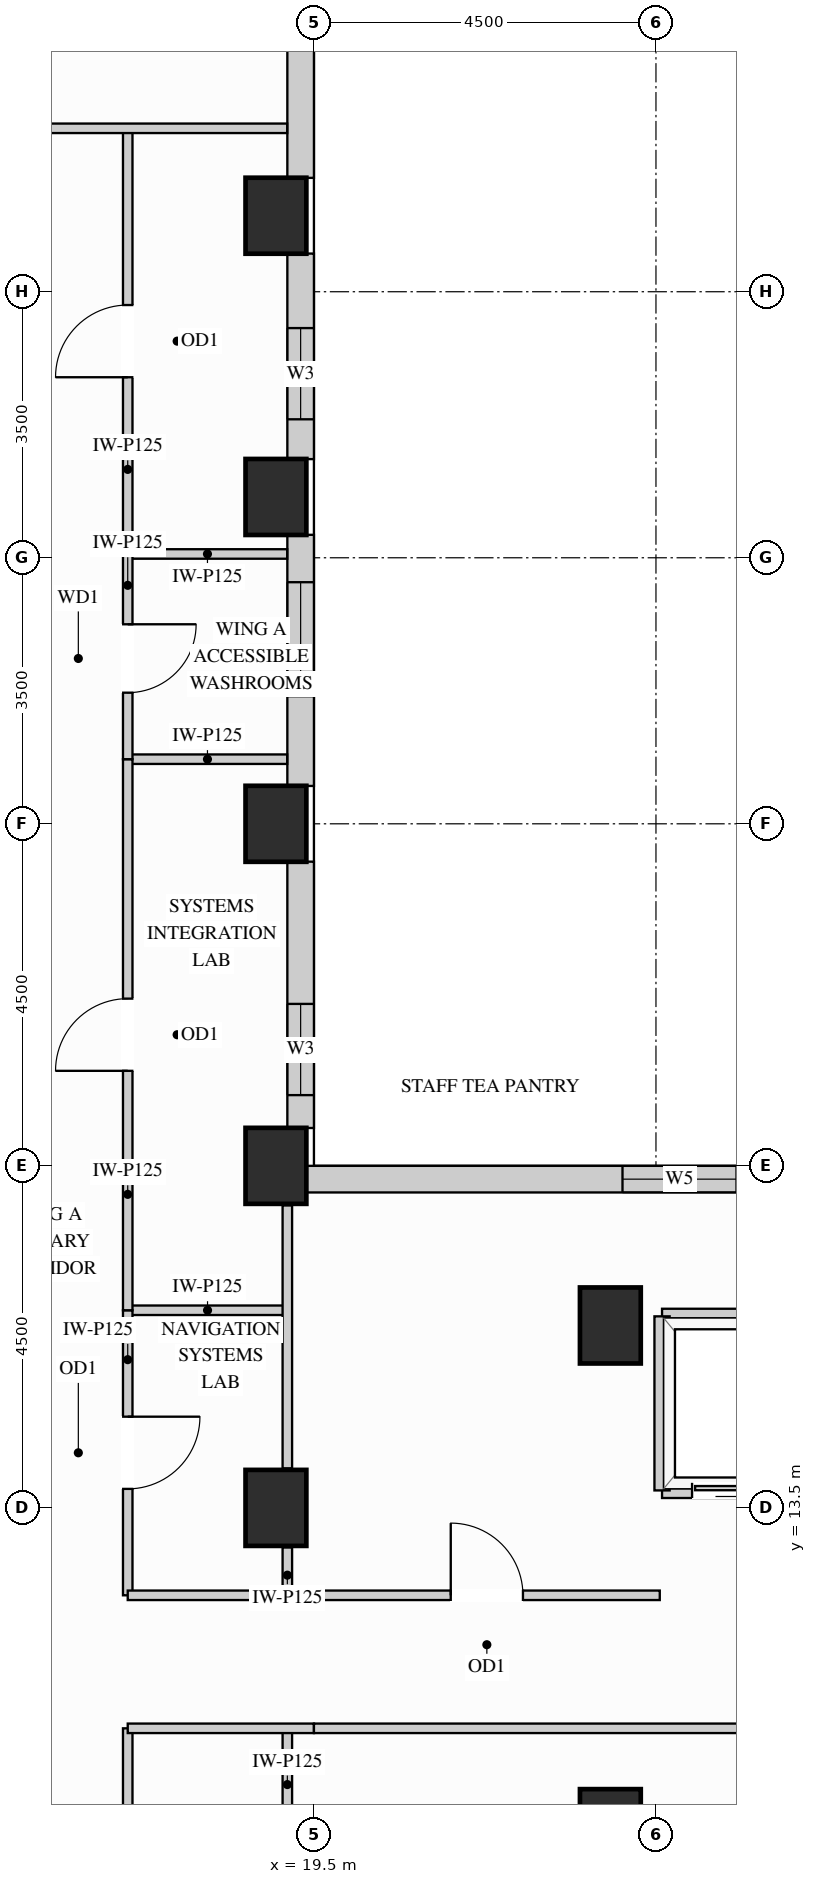
"""IFC4 building model, lengths in metres.
Left out: names, types, materials, properties, quantities, classifications, styles, units other than length and angle.
Written with IfcOpenShell. Run it as: python <this file> out.ifc"""

import sys

from ifc_helpers import new_model, si_unit, direction, frame, frame_2d, origin, origin_2d, place, context, subcontext, project, spatial, rectangle, extrude, source, transform, mapped, element, fill, save


model = new_model("IFC4")
c1 = context("Model", 3, precision=1e-05, world=origin(), true_north=direction((0.0, 1.0)))
c2 = subcontext(c1, "Body", "Model", "MODEL_VIEW")
j1 = project(units=[si_unit("LENGTHUNIT", "METRE"), si_unit("PLANEANGLEUNIT", "RADIAN")], contexts=[c1])
p1 = place(None, origin())
s1 = spatial("IfcSite", under=j1, at=p1, CompositionType="ELEMENT")
p2 = place(p1, origin())
s2 = spatial("IfcBuilding", under=s1, at=p2, CompositionType="ELEMENT")
p3 = place(p2, frame((0.0, 0.0, 143.1)))
s3 = spatial("IfcBuildingStorey", under=s2, at=p3, CompositionType="ELEMENT", Elevation=143.1)
m1 = source(origin(), c2, "Body", "SweptSolid", [
    extrude(rectangle(XDim=0.8, YDim=1.0, at=origin_2d()), origin(), (0.0, 0.0, 1.0), 3.4),
])
for number, where, z_axis, x_axis in (
    (1, (19.0, 13.5, 0.0), (0.0, 0.0, 1.0), (1.0, 0.0, 0.0)),
    (2, (19.0, 18.0, 0.0), (0.0, 0.0, 1.0), (1.0, 0.0, 0.0)),
    (3, (19.0, 22.5, 0.0), (0.0, 0.0, 1.0), (1.0, 0.0, 0.0)),
    (4, (19.0, 26.8, 0.0), (0.0, 0.0, 1.0), (1.0, 0.0, 0.0)),
    (5, (19.0, 30.5, 0.0), (0.0, 0.0, 1.0), (1.0, 0.0, 0.0)),
    (6, (23.4, 15.9, 0.0), (0.0, 0.0, 1.0), (1.0, 0.0, 0.0)),
    (7, (23.4, 9.3, 0.0), (0.0, 0.0, 1.0), (1.0, 0.0, 0.0)),
):
    element("IfcColumn", number, at=place(p3, frame(where, z_axis=z_axis, x_axis=x_axis)), inside=s3, PredefinedType="COLUMN", context=c2, shape_type="MappedRepresentation", body=[
        mapped(m1, transform((0.0, 0.0, 0.0), x_axis=(1.0, 0.0, 0.0), y_axis=(0.0, 1.0, 0.0), z_axis=(0.0, 0.0, 1.0))),
    ])
p4 = place(p3, frame((34.502, 17.825, 0.0), z_axis=(0.0, 0.0, 1.0), x_axis=(-1.0, 0.0, 0.0)))
e8 = element("IfcWall", 8, at=p4, inside=s3, PredefinedType="SOLIDWALL", context=c2, shape_type="SweptSolid", body=[
    extrude(rectangle(XDim=15.104, YDim=0.35, at=frame_2d((7.552, 0.0))), origin(), (0.0, 0.0, 1.0), 3.385),
])
p5 = place(p4, frame((4.131, 0.0, 0.78)))
e9 = element("IfcOpeningElement", 9, at=p5, cuts=e8, PredefinedType="OPENING", context=c2, shape_type="SweptSolid", body=[
    extrude(rectangle(XDim=1.5, YDim=2.0, at=frame_2d((0.75, 1.0))), frame((0.0, 0.185, 0.0), z_axis=(0.0, -1.0, 0.0), x_axis=(1.0, 0.0, 0.0)), (0.0, 0.0, 1.0), 0.37),
])
p6 = place(p4, frame((9.442, 0.0, 0.78)))
e10 = element("IfcOpeningElement", 10, at=p6, cuts=e8, PredefinedType="OPENING", context=c2, shape_type="SweptSolid", body=[
    extrude(rectangle(XDim=1.5, YDim=2.0, at=frame_2d((0.75, 1.0))), frame((0.0, 0.185, 0.0), z_axis=(0.0, -1.0, 0.0), x_axis=(1.0, 0.0, 0.0)), (0.0, 0.0, 1.0), 0.37),
])
p7 = place(p3, frame((19.325, 18.498, 0.0), z_axis=(0.0, 0.0, 1.0), x_axis=(0.0, 1.0, 0.0)))
e11 = element("IfcWall", 11, at=p7, inside=s3, PredefinedType="SOLIDWALL", context=c2, shape_type="SweptSolid", body=[
    extrude(rectangle(XDim=3.504, YDim=0.35, at=frame_2d((1.752, 0.0))), origin(), (0.0, 0.0, 1.0), 2.612),
])
p8 = place(p7, frame((0.433, 0.0, 0.78)))
e12 = element("IfcOpeningElement", 12, at=p8, cuts=e11, PredefinedType="OPENING", context=c2, shape_type="SweptSolid", body=[
    extrude(rectangle(XDim=1.2, YDim=1.652, at=frame_2d((0.6, 0.826))), frame((0.0, 0.185, 0.0), z_axis=(0.0, -1.0, 0.0), x_axis=(1.0, 0.0, 0.0)), (0.0, 0.0, 1.0), 0.37),
])
p9 = place(p3, frame((19.325, 22.998, 0.0), z_axis=(0.0, 0.0, 1.0), x_axis=(0.0, 1.0, 0.0)))
e13 = element("IfcWall", 13, at=p9, inside=s3, PredefinedType="SOLIDWALL", context=c2, shape_type="SweptSolid", body=[
    extrude(rectangle(XDim=3.304, YDim=0.35, at=frame_2d((1.652, 0.0))), origin(), (0.0, 0.0, 1.0), 2.612),
])
p10 = place(p9, frame((1.18, 0.0, 0.78)))
e14 = element("IfcOpeningElement", 14, at=p10, cuts=e13, PredefinedType="OPENING", context=c2, shape_type="SweptSolid", body=[
    extrude(rectangle(XDim=1.5, YDim=1.652, at=frame_2d((0.75, 0.826))), frame((0.0, 0.185, 0.0), z_axis=(0.0, -1.0, 0.0), x_axis=(1.0, 0.0, 0.0)), (0.0, 0.0, 1.0), 0.37),
])
p11 = place(p3, frame((19.325, 27.298, 0.0), z_axis=(0.0, 0.0, 1.0), x_axis=(0.0, 1.0, 0.0)))
e15 = element("IfcWall", 15, at=p11, inside=s3, PredefinedType="SOLIDWALL", context=c2, shape_type="SweptSolid", body=[
    extrude(rectangle(XDim=2.704, YDim=0.35, at=frame_2d((1.352, 0.0))), origin(), (0.0, 0.0, 1.0), 2.612),
])
p12 = place(p11, frame((0.524, 0.0, 0.78)))
e16 = element("IfcOpeningElement", 16, at=p12, cuts=e15, PredefinedType="OPENING", context=c2, shape_type="SweptSolid", body=[
    extrude(rectangle(XDim=1.2, YDim=1.652, at=frame_2d((0.6, 0.826))), frame((0.0, 0.185, 0.0), z_axis=(0.0, -1.0, 0.0), x_axis=(1.0, 0.0, 0.0)), (0.0, 0.0, 1.0), 0.37),
])
m2 = source(origin(), c2, "Body", "SweptSolid", [
    extrude(rectangle(XDim=3.504, YDim=0.35, at=frame_2d((1.752, 0.0))), origin(), (0.0, 0.0, 1.0), 2.612),
])
p13 = place(p3, frame((19.325, 30.998, 0.0), z_axis=(0.0, 0.0, 1.0), x_axis=(0.0, 1.0, 0.0)))
e17 = element("IfcWall", 17, at=p13, inside=s3, PredefinedType="SOLIDWALL", context=c2, shape_type="MappedRepresentation", body=[
    mapped(m2, transform((0.0, 0.0, 0.0), x_axis=(1.0, 0.0, 0.0), y_axis=(0.0, 1.0, 0.0), z_axis=(0.0, 0.0, 1.0))),
])
m3 = source(origin(), c2, "Body", "SweptSolid", [
    extrude(rectangle(XDim=2.1, YDim=0.125, at=frame_2d((1.05, 0.0))), origin(), (0.0, 0.0, 1.0), 3.385),
])
p14 = place(p3, frame((17.05, 16.1, 0.0), z_axis=(0.0, 0.0, 1.0), x_axis=(1.0, 0.0, 0.0)))
e18 = element("IfcWall", 18, at=p14, inside=s3, PredefinedType="PARTITIONING", context=c2, shape_type="MappedRepresentation", body=[
    mapped(m3, transform((0.0, 0.0, 0.0), x_axis=(1.0, 0.0, 0.0), y_axis=(0.0, 1.0, 0.0), z_axis=(0.0, 0.0, 1.0))),
])
m4 = source(origin(), c2, "Body", "SweptSolid", [
    extrude(rectangle(XDim=2.098, YDim=0.125, at=frame_2d((1.049, 0.0))), origin(), (0.0, 0.0, 1.0), 3.385),
])
for number, where, z_axis, x_axis in (
    (19, (17.05, 23.35, 0.0), (0.0, 0.0, 1.0), (1.0, 0.0, 0.0)),
    (20, (17.05, 26.05, 0.0), (0.0, 0.0, 1.0), (1.0, 0.0, 0.0)),
):
    element("IfcWall", number, at=place(p3, frame(where, z_axis=z_axis, x_axis=x_axis)), inside=s3, PredefinedType="PARTITIONING", context=c2, shape_type="MappedRepresentation", body=[
        mapped(m4, transform((0.0, 0.0, 0.0), x_axis=(1.0, 0.0, 0.0), y_axis=(0.0, 1.0, 0.0), z_axis=(0.0, 0.0, 1.0))),
    ])
m5 = source(origin(), c2, "Body", "SweptSolid", [
    extrude(rectangle(XDim=0.63, YDim=0.125, at=frame_2d((0.315, 0.0))), origin(), (0.0, 0.0, 1.0), 2.773),
])
p15 = place(p3, frame((19.15, 12.35, 0.0), z_axis=(0.0, 0.0, 1.0), x_axis=(0.0, 1.0, 0.0)))
e21 = element("IfcWall", 21, at=p15, inside=s3, PredefinedType="PARTITIONING", context=c2, shape_type="MappedRepresentation", body=[
    mapped(m5, transform((0.0, 0.0, 0.0), x_axis=(1.0, 0.0, 0.0), y_axis=(0.0, 1.0, 0.0), z_axis=(0.0, 0.0, 1.0))),
])
m6 = source(origin(), c2, "Body", "SweptSolid", [
    extrude(rectangle(XDim=3.46, YDim=0.125, at=frame_2d((1.73, 0.0))), origin(), (0.0, 0.0, 1.0), 2.773),
])
p16 = place(p3, frame((19.15, 14.02, 0.0), z_axis=(0.0, 0.0, 1.0), x_axis=(0.0, 1.0, 0.0)))
e22 = element("IfcWall", 22, at=p16, inside=s3, PredefinedType="PARTITIONING", context=c2, shape_type="MappedRepresentation", body=[
    mapped(m6, transform((0.0, 0.0, 0.0), x_axis=(1.0, 0.0, 0.0), y_axis=(0.0, 1.0, 0.0), z_axis=(0.0, 0.0, 1.0))),
])
m7 = source(origin(), c2, "Body", "SweptSolid", [
    extrude(rectangle(XDim=1.58, YDim=0.125, at=frame_2d((0.79, 0.0))), origin(), (0.0, 0.0, 1.0), 2.773),
])
p17 = place(p3, frame((19.15, 9.02, 0.0), z_axis=(0.0, 0.0, 1.0), x_axis=(0.0, 1.0, 0.0)))
e23 = element("IfcWall", 23, at=p17, inside=s3, PredefinedType="PARTITIONING", context=c2, shape_type="MappedRepresentation", body=[
    mapped(m7, transform((0.0, 0.0, 0.0), x_axis=(1.0, 0.0, 0.0), y_axis=(0.0, 1.0, 0.0), z_axis=(0.0, 0.0, 1.0))),
])
p18 = place(p3, frame((17.05, 12.35, 0.0), z_axis=(0.0, 0.0, 1.0), x_axis=(0.0, 1.0, 0.0)))
e24 = element("IfcWall", 24, at=p18, inside=s3, PredefinedType="PARTITIONING", context=c2, shape_type="SweptSolid", body=[
    extrude(rectangle(XDim=3.75, YDim=0.125, at=frame_2d((1.875, 0.0))), origin(), (0.0, 0.0, 1.0), 3.385),
])
p19 = place(p18, frame((1.4, 0.0, 0.0)))
e25 = element("IfcOpeningElement", 25, at=p19, cuts=e24, PredefinedType="OPENING", context=c2, shape_type="SweptSolid", body=[
    extrude(rectangle(XDim=0.95, YDim=2.15, at=frame_2d((0.475, 1.075))), frame((0.0, 0.073, 0.0), z_axis=(0.0, -1.0, 0.0), x_axis=(1.0, 0.0, 0.0)), (0.0, 0.0, 1.0), 0.145),
])
p20 = place(p3, frame((17.05, 16.1, 0.0), z_axis=(0.0, 0.0, 1.0), x_axis=(0.0, 1.0, 0.0)))
e26 = element("IfcWall", 26, at=p20, inside=s3, PredefinedType="PARTITIONING", context=c2, shape_type="SweptSolid", body=[
    extrude(rectangle(XDim=7.25, YDim=0.125, at=frame_2d((3.625, 0.0))), origin(), (0.0, 0.0, 1.0), 3.385),
])
p21 = place(p20, frame((3.15, 0.0, 0.0)))
e27 = element("IfcOpeningElement", 27, at=p21, cuts=e26, PredefinedType="OPENING", context=c2, shape_type="SweptSolid", body=[
    extrude(rectangle(XDim=0.95, YDim=2.15, at=frame_2d((0.475, 1.075))), frame((0.0, 0.073, 0.0), z_axis=(0.0, -1.0, 0.0), x_axis=(1.0, 0.0, 0.0)), (0.0, 0.0, 1.0), 0.145),
])
p22 = place(p3, frame((17.05, 26.05, 0.0), z_axis=(0.0, 0.0, 1.0), x_axis=(0.0, 1.0, 0.0)))
e28 = element("IfcWall", 28, at=p22, inside=s3, PredefinedType="PARTITIONING", context=c2, shape_type="SweptSolid", body=[
    extrude(rectangle(XDim=5.6, YDim=0.125, at=frame_2d((2.8, 0.0))), origin(), (0.0, 0.0, 1.0), 3.385),
])
p23 = place(p22, frame((2.325, 0.0, 0.0)))
e29 = element("IfcOpeningElement", 29, at=p23, cuts=e28, PredefinedType="OPENING", context=c2, shape_type="SweptSolid", body=[
    extrude(rectangle(XDim=0.95, YDim=2.15, at=frame_2d((0.475, 1.075))), frame((0.0, 0.073, 0.0), z_axis=(0.0, -1.0, 0.0), x_axis=(1.0, 0.0, 0.0)), (0.0, 0.0, 1.0), 0.145),
])
p24 = place(p3, frame((17.05, 4.65, 0.0), z_axis=(0.0, 0.0, 1.0), x_axis=(0.0, 1.0, 0.0)))
e30 = element("IfcWall", 30, at=p24, inside=s3, PredefinedType="PARTITIONING", context=c2, shape_type="SweptSolid", body=[
    extrude(rectangle(XDim=5.95, YDim=0.125, at=frame_2d((2.975, 0.0))), origin(), (0.0, 0.0, 1.0), 3.385),
])
p25 = place(p24, frame((2.5, 0.0, 0.0)))
e31 = element("IfcOpeningElement", 31, at=p25, cuts=e30, PredefinedType="OPENING", context=c2, shape_type="SweptSolid", body=[
    extrude(rectangle(XDim=0.95, YDim=2.15, at=frame_2d((0.475, 1.075))), frame((0.0, 0.073, 0.0), z_axis=(0.0, -1.0, 0.0), x_axis=(1.0, 0.0, 0.0)), (0.0, 0.0, 1.0), 0.145),
])
p26 = place(p3, frame((17.05, 23.35, 0.0), z_axis=(0.0, 0.0, 1.0), x_axis=(0.0, 1.0, 0.0)))
e32 = element("IfcWall", 32, at=p26, inside=s3, PredefinedType="PARTITIONING", context=c2, shape_type="SweptSolid", body=[
    extrude(rectangle(XDim=2.7, YDim=0.125, at=frame_2d((1.35, 0.0))), origin(), (0.0, 0.0, 1.0), 3.385),
])
p27 = place(p26, frame((0.875, 0.0, 0.0)))
e33 = element("IfcOpeningElement", 33, at=p27, cuts=e32, PredefinedType="OPENING", context=c2, shape_type="SweptSolid", body=[
    extrude(rectangle(XDim=0.9, YDim=2.15, at=frame_2d((0.45, 1.075))), frame((0.0, 0.073, 0.0), z_axis=(0.0, -1.0, 0.0), x_axis=(1.0, 0.0, 0.0)), (0.0, 0.0, 1.0), 0.145),
])
m8 = source(origin(), c2, "Body", "SweptSolid", [
    extrude(rectangle(XDim=12.598, YDim=0.125, at=frame_2d((6.299, 0.0))), origin(), (0.0, 0.0, 1.0), 2.848),
])
p28 = place(p3, frame((6.55, 31.65, 0.0), z_axis=(0.0, 0.0, 1.0), x_axis=(1.0, 0.0, 0.0)))
e34 = element("IfcWall", 34, at=p28, inside=s3, PredefinedType="PARTITIONING", context=c2, shape_type="MappedRepresentation", body=[
    mapped(m8, transform((0.0, 0.0, 0.0), x_axis=(1.0, 0.0, 0.0), y_axis=(0.0, 1.0, 0.0), z_axis=(0.0, 0.0, 1.0))),
])
m9 = source(origin(), c2, "Body", "SweptSolid", [
    extrude(rectangle(XDim=2.45, YDim=0.125, at=frame_2d((1.225, 0.0))), origin(), (0.0, 0.0, 1.0), 3.385),
])
p29 = place(p3, frame((17.05, 12.35, 0.0), z_axis=(0.0, 0.0, 1.0), x_axis=(1.0, 0.0, 0.0)))
e35 = element("IfcWall", 35, at=p29, inside=s3, PredefinedType="PARTITIONING", context=c2, shape_type="MappedRepresentation", body=[
    mapped(m9, transform((0.0, 0.0, 0.0), x_axis=(1.0, 0.0, 0.0), y_axis=(0.0, 1.0, 0.0), z_axis=(0.0, 0.0, 1.0))),
])
p30 = place(p3, frame((19.5, 12.35, 0.0), z_axis=(0.0, 0.0, 1.0), x_axis=(1.0, 0.0, 0.0)))
e36 = element("IfcWall", 36, at=p30, inside=s3, PredefinedType="PARTITIONING", context=c2, shape_type="SweptSolid", body=[
    extrude(rectangle(XDim=4.55, YDim=0.125, at=frame_2d((2.275, 0.0))), origin(), (0.0, 0.0, 1.0), 3.385),
])
p31 = place(p30, frame((1.8, 0.0, 0.0)))
e37 = element("IfcOpeningElement", 37, at=p31, cuts=e36, PredefinedType="OPENING", context=c2, shape_type="SweptSolid", body=[
    extrude(rectangle(XDim=0.95, YDim=2.15, at=frame_2d((0.475, 1.075))), frame((0.0, 0.073, 0.0), z_axis=(0.0, -1.0, 0.0), x_axis=(1.0, 0.0, 0.0)), (0.0, 0.0, 1.0), 0.145),
])
p32 = place(p3, frame((17.05, 10.6, 0.0), z_axis=(0.0, 0.0, 1.0), x_axis=(1.0, 0.0, 0.0)))
e38 = element("IfcWall", 38, at=p32, inside=s3, PredefinedType="PARTITIONING", context=c2, shape_type="MappedRepresentation", body=[
    mapped(m9, transform((0.0, 0.0, 0.0), x_axis=(1.0, 0.0, 0.0), y_axis=(0.0, 1.0, 0.0), z_axis=(0.0, 0.0, 1.0))),
])
p33 = place(p3, frame((19.5, 10.6, 0.0), z_axis=(0.0, 0.0, 1.0), x_axis=(1.0, 0.0, 0.0)))
e39 = element("IfcWall", 39, at=p33, inside=s3, PredefinedType="PARTITIONING", context=c2, shape_type="SweptSolid", body=[
    extrude(rectangle(XDim=14.9, YDim=0.125, at=frame_2d((7.45, 0.0))), origin(), (0.0, 0.0, 1.0), 3.385),
])
p34 = place(p33, frame((6.975, 0.0, 0.0)))
e40 = element("IfcOpeningElement", 40, at=p34, cuts=e39, PredefinedType="OPENING", context=c2, shape_type="SweptSolid", body=[
    extrude(rectangle(XDim=0.95, YDim=2.15, at=frame_2d((0.475, 1.075))), frame((0.0, 0.073, 0.0), z_axis=(0.0, -1.0, 0.0), x_axis=(1.0, 0.0, 0.0)), (0.0, 0.0, 1.0), 0.145),
])
m10 = source(origin(), c2, "Body", "SweptSolid", [
    extrude(rectangle(XDim=1.89, YDim=0.2, at=frame_2d((0.945, 0.0))), origin(), (0.0, 0.0, 1.0), 2.773),
])
p35 = place(p3, frame((24.08, 16.02, 0.0), z_axis=(0.0, 0.0, 1.0), x_axis=(1.0, 0.0, 0.0)))
e41 = element("IfcWall", 41, at=p35, inside=s3, PredefinedType="PARTITIONING", context=c2, shape_type="MappedRepresentation", body=[
    mapped(m10, transform((0.0, 0.0, 0.0), x_axis=(1.0, 0.0, 0.0), y_axis=(0.0, 1.0, 0.0), z_axis=(0.0, 0.0, 1.0))),
])
p36 = place(p3, frame((24.08, 13.73, 0.0), z_axis=(0.0, 0.0, 1.0), x_axis=(1.0, 0.0, 0.0)))
e42 = element("IfcWall", 42, at=p36, inside=s3, PredefinedType="PARTITIONING", context=c2, shape_type="SweptSolid", body=[
    extrude(rectangle(XDim=1.89, YDim=0.2, at=frame_2d((0.945, 0.0))), origin(), (0.0, 0.0, 1.0), 2.466),
])
p37 = place(p36, frame((0.395, 0.0, 0.0)))
e43 = element("IfcOpeningElement", 43, at=p37, cuts=e42, PredefinedType="OPENING", context=c2, shape_type="SweptSolid", body=[
    extrude(rectangle(XDim=1.1, YDim=2.2, at=frame_2d((0.55, 1.1))), frame((0.0, 0.11, 0.0), z_axis=(0.0, -1.0, 0.0), x_axis=(1.0, 0.0, 0.0)), (0.0, 0.0, 1.0), 0.22),
])
m11 = source(origin(), c2, "Body", "SweptSolid", [
    extrude(rectangle(XDim=2.29, YDim=0.2, at=frame_2d((1.145, 0.0))), origin(), (0.0, 0.0, 1.0), 3.385),
])
p38 = place(p3, frame((24.08, 13.73, 0.0), z_axis=(0.0, 0.0, 1.0), x_axis=(0.0, 1.0, 0.0)))
e44 = element("IfcWall", 44, at=p38, inside=s3, PredefinedType="PARTITIONING", context=c2, shape_type="MappedRepresentation", body=[
    mapped(m11, transform((0.0, 0.0, 0.0), x_axis=(1.0, 0.0, 0.0), y_axis=(0.0, 1.0, 0.0), z_axis=(0.0, 0.0, 1.0))),
])
m12 = source(origin(), c2, "Body", "SweptSolid", [
    extrude(rectangle(XDim=1.1, YDim=2.2, at=frame_2d((0.55, 1.1))), frame((0.0, 0.025, 0.0), z_axis=(0.0, -1.0, 0.0), x_axis=(1.0, 0.0, 0.0)), (0.0, 0.0, 1.0), 0.05),
])
p39 = place(p37, origin())
e45 = element("IfcDoor", 45, at=p39, inside=s3, OperationType="SLIDING_TO_LEFT", PredefinedType="DOOR", context=c2, shape_type="MappedRepresentation", body=[
    mapped(m12, transform((0.0, 0.0, 0.0), x_axis=(1.0, 0.0, 0.0), y_axis=(0.0, 1.0, 0.0), z_axis=(0.0, 0.0, 1.0))),
])
fill(e43, e45)
m13 = source(origin(), c2, "Body", "SweptSolid", [
    extrude(rectangle(XDim=0.95, YDim=2.15, at=frame_2d((0.475, 1.075))), frame((0.0, 0.025, 0.0), z_axis=(0.0, -1.0, 0.0), x_axis=(1.0, 0.0, 0.0)), (0.0, 0.0, 1.0), 0.05),
])
p40 = place(p19, origin())
e46 = element("IfcDoor", 46, at=p40, inside=s3, OperationType="SINGLE_SWING_RIGHT", PredefinedType="DOOR", context=c2, shape_type="MappedRepresentation", body=[
    mapped(m13, transform((0.0, 0.0, 0.0), x_axis=(1.0, 0.0, 0.0), y_axis=(0.0, 1.0, 0.0), z_axis=(0.0, 0.0, 1.0))),
])
fill(e25, e46)
p41 = place(p21, origin())
e47 = element("IfcDoor", 47, at=p41, inside=s3, OperationType="SINGLE_SWING_LEFT", PredefinedType="DOOR", context=c2, shape_type="MappedRepresentation", body=[
    mapped(m13, transform((0.0, 0.0, 0.0), x_axis=(1.0, 0.0, 0.0), y_axis=(0.0, 1.0, 0.0), z_axis=(0.0, 0.0, 1.0))),
])
fill(e27, e47)
p42 = place(p23, origin())
e48 = element("IfcDoor", 48, at=p42, inside=s3, OperationType="SINGLE_SWING_LEFT", PredefinedType="DOOR", context=c2, shape_type="MappedRepresentation", body=[
    mapped(m13, transform((0.0, 0.0, 0.0), x_axis=(1.0, 0.0, 0.0), y_axis=(0.0, 1.0, 0.0), z_axis=(0.0, 0.0, 1.0))),
])
fill(e29, e48)
p43 = place(p31, origin())
e49 = element("IfcDoor", 49, at=p43, inside=s3, OperationType="SINGLE_SWING_LEFT", PredefinedType="DOOR", context=c2, shape_type="MappedRepresentation", body=[
    mapped(m13, transform((0.0, 0.0, 0.0), x_axis=(1.0, 0.0, 0.0), y_axis=(0.0, 1.0, 0.0), z_axis=(0.0, 0.0, 1.0))),
])
fill(e37, e49)
m14 = source(origin(), c2, "Body", "SweptSolid", [
    extrude(rectangle(XDim=0.9, YDim=2.15, at=frame_2d((0.45, 1.075))), frame((0.0, 0.025, 0.0), z_axis=(0.0, -1.0, 0.0), x_axis=(1.0, 0.0, 0.0)), (0.0, 0.0, 1.0), 0.05),
])
p44 = place(p27, origin())
e50 = element("IfcDoor", 50, at=p44, inside=s3, OperationType="SINGLE_SWING_RIGHT", PredefinedType="DOOR", context=c2, shape_type="MappedRepresentation", body=[
    mapped(m14, transform((0.0, 0.0, 0.0), x_axis=(1.0, 0.0, 0.0), y_axis=(0.0, 1.0, 0.0), z_axis=(0.0, 0.0, 1.0))),
])
fill(e33, e50)
m15 = source(origin(), c2, "Body", "SweptSolid", [
    extrude(rectangle(XDim=1.2, YDim=1.652, at=frame_2d((0.6, 0.826))), frame((0.0, 0.03, 0.0), z_axis=(0.0, -1.0, 0.0), x_axis=(1.0, 0.0, 0.0)), (0.0, 0.0, 1.0), 0.06),
])
p45 = place(p8, origin())
e51 = element("IfcWindow", 51, at=p45, inside=s3, PartitioningType="SINGLE_PANEL", PredefinedType="WINDOW", context=c2, shape_type="MappedRepresentation", body=[
    mapped(m15, transform((0.0, 0.0, 0.0), x_axis=(1.0, 0.0, 0.0), y_axis=(0.0, 1.0, 0.0), z_axis=(0.0, 0.0, 1.0))),
])
fill(e12, e51)
p46 = place(p12, origin())
e52 = element("IfcWindow", 52, at=p46, inside=s3, PartitioningType="SINGLE_PANEL", PredefinedType="WINDOW", context=c2, shape_type="MappedRepresentation", body=[
    mapped(m15, transform((0.0, 0.0, 0.0), x_axis=(1.0, 0.0, 0.0), y_axis=(0.0, 1.0, 0.0), z_axis=(0.0, 0.0, 1.0))),
])
fill(e16, e52)
m16 = source(origin(), c2, "Body", "SweptSolid", [
    extrude(rectangle(XDim=1.5, YDim=2.0, at=frame_2d((0.75, 1.0))), frame((0.0, 0.03, 0.0), z_axis=(0.0, -1.0, 0.0), x_axis=(1.0, 0.0, 0.0)), (0.0, 0.0, 1.0), 0.06),
])
p47 = place(p6, origin())
e53 = element("IfcWindow", 53, at=p47, inside=s3, PartitioningType="SINGLE_PANEL", PredefinedType="WINDOW", context=c2, shape_type="MappedRepresentation", body=[
    mapped(m16, transform((0.0, 0.0, 0.0), x_axis=(1.0, 0.0, 0.0), y_axis=(0.0, 1.0, 0.0), z_axis=(0.0, 0.0, 1.0))),
])
fill(e10, e53)
m17 = source(origin(), c2, "Body", "SweptSolid", [
    extrude(rectangle(XDim=1.5, YDim=1.652, at=frame_2d((0.75, 0.826))), frame((0.0, 0.03, 0.0), z_axis=(0.0, -1.0, 0.0), x_axis=(1.0, 0.0, 0.0)), (0.0, 0.0, 1.0), 0.06),
])
p48 = place(p10, origin())
e54 = element("IfcWindow", 54, at=p48, inside=s3, PartitioningType="SINGLE_PANEL", PredefinedType="WINDOW", context=c2, shape_type="MappedRepresentation", body=[
    mapped(m17, transform((0.0, 0.0, 0.0), x_axis=(1.0, 0.0, 0.0), y_axis=(0.0, 1.0, 0.0), z_axis=(0.0, 0.0, 1.0))),
])
fill(e14, e54)
save(model, sys.argv[1])
